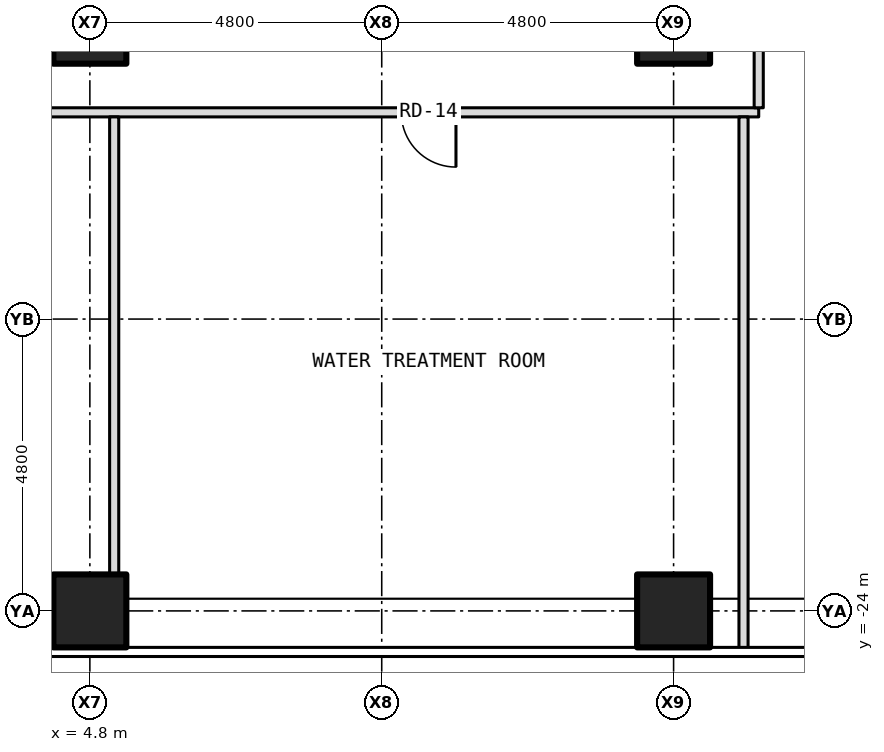
"""IFC4 building model, lengths in metres.
Left out: names, types, materials, properties, quantities, classifications, styles, units other than length and angle.
Written with IfcOpenShell. Run it as: python <this file> out.ifc"""

import sys

from ifc_helpers import new_model, si_unit, direction, frame, frame_2d, origin, origin_2d, place, context, subcontext, project, spatial, rectangle, hollow_rectangle, extrude, element, fill, save


model = new_model("IFC4")
c1 = context("Model", 3, precision=1e-05, world=origin(), true_north=direction((0.0, 1.0)))
c2 = subcontext(c1, "Body", "Model", "MODEL_VIEW")
j1 = project(units=[si_unit("LENGTHUNIT", "METRE"), si_unit("PLANEANGLEUNIT", "RADIAN")], contexts=[c1])
p1 = place(None, origin())
s1 = spatial("IfcSite", under=j1, at=p1, CompositionType="ELEMENT")
p2 = place(p1, origin())
s2 = spatial("IfcBuilding", under=s1, at=p2, CompositionType="ELEMENT")
p3 = place(p2, frame((0.0, 0.0, 33.5)))
s3 = spatial("IfcBuildingStorey", under=s2, at=p3, CompositionType="ELEMENT", Elevation=33.5)
for number, where, z_axis, x_axis in (
    (1, (4.8, -24.0, -0.3), (0.0, 0.0, 1.0), (1.0, 0.0, 0.0)),
    (2, (14.4, -24.0, -0.3), (0.0, 0.0, 1.0), (1.0, 0.0, 0.0)),
    (3, (4.8, -14.4, -0.3), (0.0, 0.0, 1.0), (1.0, 0.0, 0.0)),
    (4, (14.4, -14.4, -0.3), (0.0, 0.0, 1.0), (1.0, 0.0, 0.0)),
):
    element("IfcColumn", number, at=place(p3, frame(where, z_axis=z_axis, x_axis=x_axis)), inside=s3, PredefinedType="COLUMN", context=c2, shape_type="SweptSolid", body=[
        extrude(hollow_rectangle(XDim=1.2, YDim=1.2, WallThickness=0.07, at=origin_2d()), origin(), (0.0, 0.0, 1.0), 5.65),
    ])
p4 = place(p3, frame((-15.8, -15.8, 0.0), z_axis=(0.0, 0.0, 1.0), x_axis=(1.0, 0.0, 0.0)))
e5 = element("IfcWall", 5, at=p4, inside=s3, PredefinedType="PARTITIONING", context=c2, shape_type="SweptSolid", body=[
    extrude(rectangle(XDim=31.6, YDim=0.15, at=frame_2d((15.8, 0.0))), origin(), (0.0, 0.0, 1.0), 5.35),
])
p5 = place(p4, frame((4.98, 0.0, 0.0)))
e6 = element("IfcOpeningElement", 6, at=p5, cuts=e5, PredefinedType="OPENING", context=c2, shape_type="SweptSolid", body=[
    extrude(rectangle(XDim=0.9, YDim=2.1, at=frame_2d((0.45, 1.05))), frame((0.0, 0.087, 0.0), z_axis=(0.0, -1.0, 0.0), x_axis=(1.0, 0.0, 0.0)), (0.0, 0.0, 1.0), 0.174),
])
p6 = place(p4, frame((15.35, 0.0, 0.0)))
e7 = element("IfcOpeningElement", 7, at=p6, cuts=e5, PredefinedType="OPENING", context=c2, shape_type="SweptSolid", body=[
    extrude(rectangle(XDim=0.9, YDim=2.1, at=frame_2d((0.45, 1.05))), frame((0.0, 0.087, 0.0), z_axis=(0.0, -1.0, 0.0), x_axis=(1.0, 0.0, 0.0)), (0.0, 0.0, 1.0), 0.174),
])
p7 = place(p4, frame((25.721, 0.0, 0.0)))
e8 = element("IfcOpeningElement", 8, at=p7, cuts=e5, PredefinedType="OPENING", context=c2, shape_type="SweptSolid", body=[
    extrude(rectangle(XDim=0.9, YDim=2.1, at=frame_2d((0.45, 1.05))), frame((0.0, 0.087, 0.0), z_axis=(0.0, -1.0, 0.0), x_axis=(1.0, 0.0, 0.0)), (0.0, 0.0, 1.0), 0.174),
])
p8 = place(p3, frame((5.2, -23.88, 0.0), z_axis=(0.0, 0.0, 1.0), x_axis=(0.0, 1.0, 0.0)))
e9 = element("IfcWall", 9, at=p8, inside=s3, PredefinedType="PARTITIONING", context=c2, shape_type="SweptSolid", body=[
    extrude(rectangle(XDim=8.005, YDim=0.15, at=frame_2d((4.002, 0.0))), origin(), (0.0, 0.0, 1.0), 5.35),
])
p9 = place(p3, frame((15.55, -24.63, 0.0), z_axis=(0.0, 0.0, 1.0), x_axis=(0.0, 1.0, 0.0)))
e10 = element("IfcWall", 10, at=p9, inside=s3, PredefinedType="PARTITIONING", context=c2, shape_type="SweptSolid", body=[
    extrude(rectangle(XDim=8.755, YDim=0.15, at=frame_2d((4.377, 0.0))), origin(), (0.0, 0.0, 1.0), 5.35),
])
p10 = place(p3, frame((15.8, -15.725, 0.0), z_axis=(0.0, 0.0, 1.0), x_axis=(0.0, 1.0, 0.0)))
e11 = element("IfcWall", 11, at=p10, inside=s3, PredefinedType="PARTITIONING", context=c2, shape_type="SweptSolid", body=[
    extrude(rectangle(XDim=4.805, YDim=0.15, at=frame_2d((2.403, 0.0))), origin(), (0.0, 0.0, 1.0), 5.35),
])
p11 = place(p10, frame((3.075, 0.0, 0.0)))
e12 = element("IfcOpeningElement", 12, at=p11, cuts=e11, PredefinedType="OPENING", context=c2, shape_type="SweptSolid", body=[
    extrude(rectangle(XDim=0.9, YDim=2.1, at=frame_2d((0.45, 1.05))), frame((0.0, 0.087, 0.0), z_axis=(0.0, -1.0, 0.0), x_axis=(1.0, 0.0, 0.0)), (0.0, 0.0, 1.0), 0.174),
])
p12 = place(p7, origin())
e13 = element("IfcDoor", 13, at=p12, inside=s3, OperationType="SINGLE_SWING_RIGHT", PredefinedType="DOOR", context=c2, shape_type="SweptSolid", body=[
    extrude(rectangle(XDim=0.9, YDim=2.1, at=frame_2d((0.45, 1.05))), frame((0.0, 0.025, 0.0), z_axis=(0.0, -1.0, 0.0), x_axis=(1.0, 0.0, 0.0)), (0.0, 0.0, 1.0), 0.05),
])
fill(e8, e13)
save(model, sys.argv[1])
